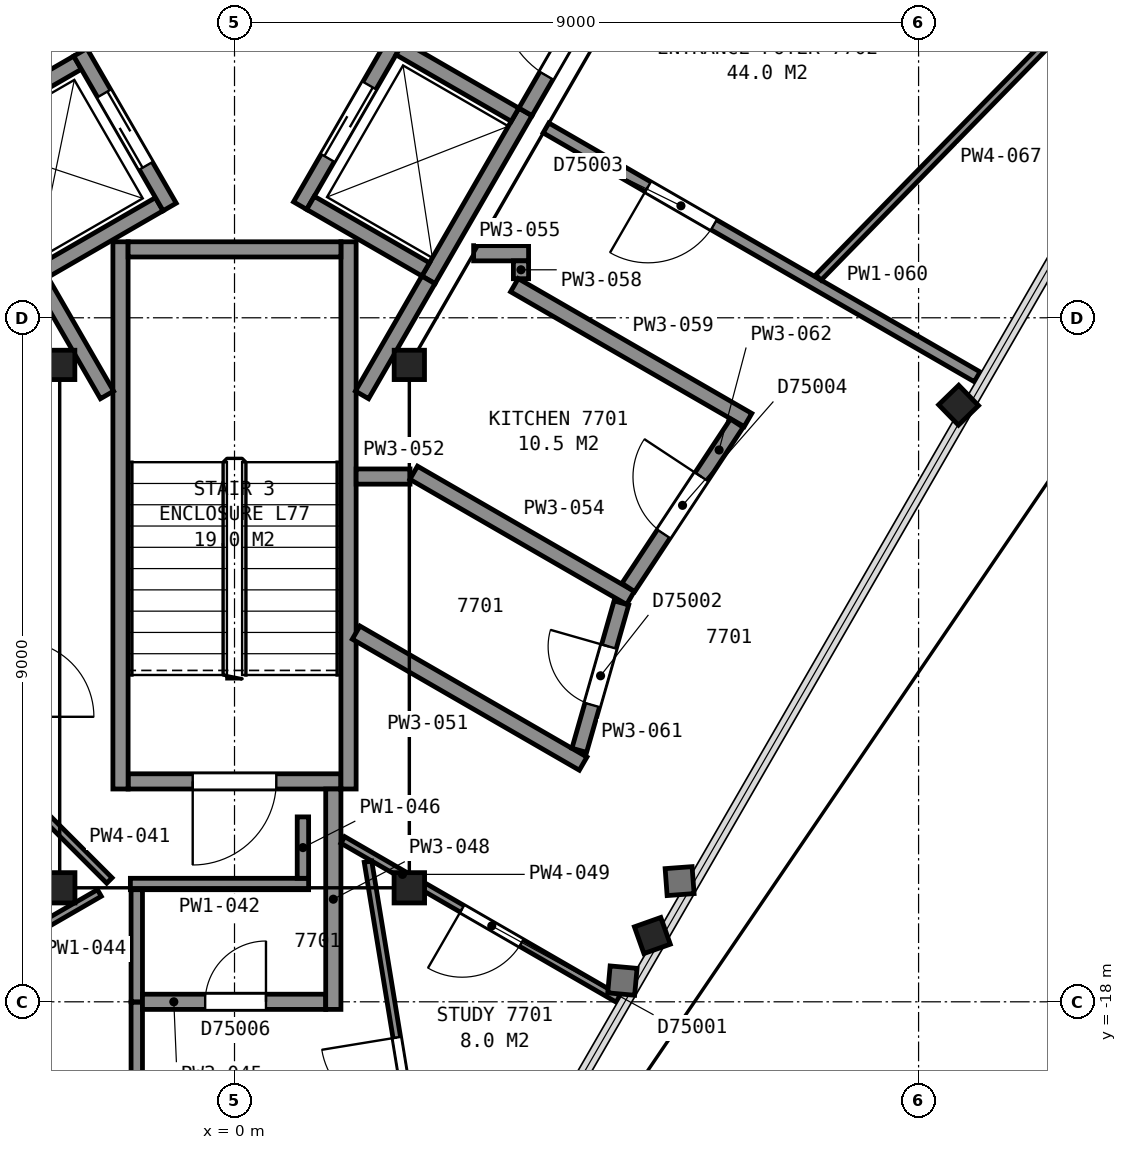
"""IFC4 building model, lengths in metres.
Left out: names, types, materials, properties, quantities, classifications, styles, units other than length and angle.
Written with IfcOpenShell. Run it as: python <this file> out.ifc"""

import sys

from ifc_helpers import new_model, si_unit, direction, frame, frame_2d, origin, origin_2d, place, context, subcontext, project, spatial, rectangle, i_section, extrude, element, fill, save


model = new_model("IFC4")
c1 = context("Model", 3, precision=1e-05, world=origin(), true_north=direction((0.0, 1.0)))
c2 = subcontext(c1, "Body", "Model", "MODEL_VIEW")
j1 = project(units=[si_unit("LENGTHUNIT", "METRE"), si_unit("PLANEANGLEUNIT", "RADIAN")], contexts=[c1])
p1 = place(None, origin())
s1 = spatial("IfcSite", under=j1, at=p1, CompositionType="ELEMENT")
p2 = place(p1, origin())
s2 = spatial("IfcBuilding", under=s1, at=p2, CompositionType="ELEMENT")
p3 = place(p2, frame((0.0, 0.0, 304.7)))
s3 = spatial("IfcBuildingStorey", under=s2, at=p3, CompositionType="ELEMENT", Elevation=304.7)
p4 = place(p3, frame((5.634, -17.512, 0.055), z_axis=(-0.112062196474, 0.31581164461, 0.942181017242), x_axis=(-0.487199113903, -0.843834781896, 0.224899720486)))
e1 = element("IfcColumn", 1, at=p4, inside=s3, PredefinedType="COLUMN", context=c2, shape_type="SweptSolid", body=[
    extrude(i_section(OverallWidth=0.373, OverallDepth=0.368, WebThickness=0.015, FlangeThickness=0.024, FilletRadius=0.015, at=origin_2d()), origin(), (0.0, 0.0, 1.0), 3.81),
])
p5 = place(p3, frame((9.751, -10.381, 0.045), z_axis=(-0.187414704281, 0.192691239229, 0.963195626518), x_axis=(-0.498724706912, -0.863448717299, 0.075696626808)))
e2 = element("IfcColumn", 2, at=p5, inside=s3, PredefinedType="COLUMN", context=c2, shape_type="SweptSolid", body=[
    extrude(i_section(OverallWidth=0.373, OverallDepth=0.368, WebThickness=0.015, FlangeThickness=0.024, FilletRadius=0.015, at=origin_2d()), origin(), (0.0, 0.0, 1.0), 3.748),
])
p6 = place(p3, frame((-2.3, -9.62, 0.0), z_axis=(0.0, 0.0, 1.0), x_axis=(1.0, 0.0, 0.0)))
e3 = element("IfcColumn", 3, at=p6, inside=s3, PredefinedType="COLUMN", context=c2, shape_type="SweptSolid", body=[
    extrude(i_section(OverallWidth=0.399, OverallDepth=0.386, WebThickness=0.021, FlangeThickness=0.033, FilletRadius=0.015, at=origin_2d()), origin(), (0.0, 0.0, 1.0), 3.7),
])
for number, where, z_axis, x_axis in (
    (4, (-2.3, -16.5, 0.0), (0.0, 0.0, 1.0), (-1.0, 0.0, 0.0)),
    (5, (2.3, -16.5, 0.0), (0.0, 0.0, 1.0), (-1.0, 0.0, 0.0)),
):
    element("IfcColumn", number, at=place(p3, frame(where, z_axis=z_axis, x_axis=x_axis)), inside=s3, PredefinedType="COLUMN", context=c2, shape_type="SweptSolid", body=[
        extrude(i_section(OverallWidth=0.401, OverallDepth=0.399, WebThickness=0.025, FlangeThickness=0.04, FilletRadius=0.015, at=origin_2d()), origin(), (0.0, 0.0, 1.0), 3.7),
    ])
p7 = place(p3, frame((2.3, -9.62, 0.0), z_axis=(0.0, 0.0, 1.0), x_axis=(1.0, 0.0, 0.0)))
e6 = element("IfcColumn", 6, at=p7, inside=s3, PredefinedType="COLUMN", context=c2, shape_type="SweptSolid", body=[
    extrude(i_section(OverallWidth=0.399, OverallDepth=0.386, WebThickness=0.021, FlangeThickness=0.033, FilletRadius=0.015, at=origin_2d()), origin(), (0.0, 0.0, 1.0), 3.7),
])
p8 = place(p3, frame((-1.4, -15.1, 0.0), z_axis=(0.0, 0.0, 1.0), x_axis=(1.0, 0.0, 0.0)))
e7 = element("IfcWall", 7, at=p8, inside=s3, PredefinedType="PARTITIONING", context=c2, shape_type="SweptSolid", body=[
    extrude(rectangle(XDim=2.8, YDim=0.2, at=frame_2d((1.4, 0.0))), origin(), (0.0, 0.0, 1.0), 3.45),
])
p9 = place(p8, frame((0.85, 0.0, 0.0)))
e8 = element("IfcOpeningElement", 8, at=p9, cuts=e7, PredefinedType="OPENING", context=c2, shape_type="SweptSolid", body=[
    extrude(rectangle(XDim=1.1, YDim=2.1, at=frame_2d((0.55, 1.05))), frame((0.0, 0.11, 0.0), z_axis=(0.0, -1.0, 0.0), x_axis=(1.0, 0.0, 0.0)), (0.0, 0.0, 1.0), 0.22),
])
for number, where, z_axis, x_axis in (
    (9, (1.5, -8.0, 0.0), (0.0, 0.0, 1.0), (0.0, -1.0, 0.0)),
    (10, (-1.5, -8.0, 0.0), (0.0, 0.0, 1.0), (0.0, -1.0, 0.0)),
):
    element("IfcWall", number, at=place(p3, frame(where, z_axis=z_axis, x_axis=x_axis)), inside=s3, PredefinedType="PARTITIONING", context=c2, shape_type="SweptSolid", body=[
        extrude(rectangle(XDim=7.2, YDim=0.2, at=frame_2d((3.6, 0.0))), origin(), (0.0, 0.0, 1.0), 3.45),
    ])
p10 = place(p3, frame((-1.4, -8.1, 0.0), z_axis=(0.0, 0.0, 1.0), x_axis=(1.0, 0.0, 0.0)))
e11 = element("IfcWall", 11, at=p10, inside=s3, PredefinedType="PARTITIONING", context=c2, shape_type="SweptSolid", body=[
    extrude(rectangle(XDim=2.8, YDim=0.2, at=frame_2d((1.4, 0.0))), origin(), (0.0, 0.0, 1.0), 3.45),
])
for number, where, z_axis, x_axis in (
    (12, (-2.505, -8.38, 0.0), (0.0, 0.0, 1.0), (0.866, 0.5, 0.0)),
    (13, (-3.58, -6.519, 0.0), (0.0, 0.0, 1.0), (0.866, 0.5, 0.0)),
):
    element("IfcWall", number, at=place(p3, frame(where, z_axis=z_axis, x_axis=x_axis)), inside=s3, PredefinedType="PARTITIONING", context=c2, shape_type="SweptSolid", body=[
        extrude(rectangle(XDim=1.75, YDim=0.2, at=frame_2d((0.875, 0.0))), origin(), (0.0, 0.0, 1.0), 3.7),
    ])
p11 = place(p3, frame((2.552, -8.5, 0.0), z_axis=(0.0, 0.0, 1.0), x_axis=(0.499990435942, 0.866030925526, 0.0)))
e14 = element("IfcWall", 14, at=p11, inside=s3, PredefinedType="PARTITIONING", context=c2, shape_type="SweptSolid", body=[
    extrude(rectangle(XDim=2.55, YDim=0.2, at=frame_2d((1.275, 0.0))), origin(), (0.0, 0.0, 1.0), 3.7),
])
p12 = place(p3, frame((0.863, -7.525, 0.0), z_axis=(0.0, 0.0, 1.0), x_axis=(0.499990435942, 0.866030925526, 0.0)))
e15 = element("IfcWall", 15, at=p12, inside=s3, PredefinedType="PARTITIONING", context=c2, shape_type="SweptSolid", body=[
    extrude(rectangle(XDim=2.55, YDim=0.2, at=frame_2d((1.275, 0.0))), origin(), (0.0, 0.0, 1.0), 3.7),
])
p13 = place(p12, frame((0.725, 0.0, 0.0)))
e16 = element("IfcOpeningElement", 16, at=p13, cuts=e15, PredefinedType="OPENING", context=c2, shape_type="SweptSolid", body=[
    extrude(rectangle(XDim=1.1, YDim=2.1, at=frame_2d((0.55, 1.05))), frame((0.0, 0.11, 0.0), z_axis=(0.0, -1.0, 0.0), x_axis=(1.0, 0.0, 0.0)), (0.0, 0.0, 1.0), 0.22),
])
p14 = place(p3, frame((-0.853, -7.542, 0.0), z_axis=(0.0, 0.0, 1.0), x_axis=(-0.500016218704, 0.866016039709, 0.0)))
e17 = element("IfcWall", 17, at=p14, inside=s3, PredefinedType="PARTITIONING", context=c2, shape_type="SweptSolid", body=[
    extrude(rectangle(XDim=2.35, YDim=0.2, at=frame_2d((1.175, 0.0))), origin(), (0.0, 0.0, 1.0), 3.7),
])
p15 = place(p14, frame((0.625, 0.0, 0.0)))
e18 = element("IfcOpeningElement", 18, at=p15, cuts=e17, PredefinedType="OPENING", context=c2, shape_type="SweptSolid", body=[
    extrude(rectangle(XDim=1.1, YDim=2.1, at=frame_2d((0.55, 1.05))), frame((0.0, 0.11, 0.0), z_axis=(0.0, -1.0, 0.0), x_axis=(1.0, 0.0, 0.0)), (0.0, 0.0, 1.0), 0.22),
])
for number, where, z_axis, x_axis in (
    (19, (3.69, -6.328, 0.0), (0.0, 0.0, 1.0), (-0.866, 0.5, 0.0)),
    (20, (2.515, -8.363, 0.0), (0.0, 0.0, 1.0), (-0.866, 0.5, 0.0)),
):
    element("IfcWall", number, at=place(p3, frame(where, z_axis=z_axis, x_axis=x_axis)), inside=s3, PredefinedType="PARTITIONING", context=c2, shape_type="SweptSolid", body=[
        extrude(rectangle(XDim=1.75, YDim=0.2, at=frame_2d((0.875, 0.0))), origin(), (0.0, 0.0, 1.0), 3.7),
    ])
p16 = place(p3, frame((-2.541, -8.519, 0.0), z_axis=(0.0, 0.0, 1.0), x_axis=(0.500016142392, -0.86601608377, 0.0)))
e21 = element("IfcWall", 21, at=p16, inside=s3, PredefinedType="PARTITIONING", context=c2, shape_type="SweptSolid", body=[
    extrude(rectangle(XDim=1.727, YDim=0.2, at=frame_2d((0.864, 0.0))), origin(), (0.0, 0.0, 1.0), 3.45),
])
p17 = place(p3, frame((1.677, -10.015, 0.0), z_axis=(0.0, 0.0, 1.0), x_axis=(0.49983532306, 0.866120459187, 0.0)))
e22 = element("IfcWall", 22, at=p17, inside=s3, PredefinedType="PARTITIONING", context=c2, shape_type="SweptSolid", body=[
    extrude(rectangle(XDim=1.748, YDim=0.2, at=frame_2d((0.874, 0.0))), origin(), (0.0, 0.0, 1.0), 3.45),
])
p18 = place(p3, frame((3.828, -6.29, 0.0), z_axis=(0.0, 0.0, 1.0), x_axis=(0.499979739078, 0.866037101117, 0.0)))
e23 = element("IfcWall", 23, at=p18, inside=s3, PredefinedType="PARTITIONING", context=c2, shape_type="SweptSolid", body=[
    extrude(rectangle(XDim=11.363, YDim=0.2, at=frame_2d((5.681, 0.0))), origin(), (0.0, 0.0, 1.0), 3.45),
])
p19 = place(p18, frame((0.55, 0.0, 0.0)))
e24 = element("IfcOpeningElement", 24, at=p19, cuts=e23, PredefinedType="OPENING", context=c2, shape_type="SweptSolid", body=[
    extrude(rectangle(XDim=1.2, YDim=2.1, at=frame_2d((0.6, 1.05))), frame((0.0, 0.11, 0.0), z_axis=(0.0, -1.0, 0.0), x_axis=(1.0, 0.0, 0.0)), (0.0, 0.0, 1.0), 0.22),
])
p20 = place(p3, frame((-1.778, -16.568, 0.0), z_axis=(0.0, 0.0, 1.0), x_axis=(-0.866019606374, -0.500010041276, 0.0)))
e25 = element("IfcWall", 25, at=p20, inside=s3, PredefinedType="PARTITIONING", context=c2, shape_type="SweptSolid", body=[
    extrude(rectangle(XDim=3.527, YDim=0.1, at=frame_2d((1.764, 0.0))), origin(), (0.0, 0.0, 1.0), 2.723),
])
p21 = place(p20, frame((1.124, 0.0, 0.0)))
e26 = element("IfcOpeningElement", 26, at=p21, cuts=e25, PredefinedType="OPENING", context=c2, shape_type="SweptSolid", body=[
    extrude(rectangle(XDim=1.0, YDim=2.1, at=frame_2d((0.5, 1.05))), frame((0.0, 0.06, 0.0), z_axis=(0.0, -1.0, 0.0), x_axis=(1.0, 0.0, 0.0)), (0.0, 0.0, 1.0), 0.12),
])
p22 = place(p3, frame((-2.801, -15.25, 0.0), z_axis=(0.0, 0.0, 1.0), x_axis=(0.707181547962, -0.707032006505, 0.0)))
e27 = element("IfcWall", 27, at=p22, inside=s3, PredefinedType="PARTITIONING", context=c2, shape_type="SweptSolid", body=[
    extrude(rectangle(XDim=1.633, YDim=0.1, at=frame_2d((0.816, 0.0))), origin(), (0.0, 0.0, 1.0), 2.723),
])
p23 = place(p3, frame((-1.37, -16.45, 0.0), z_axis=(0.0, 0.0, 1.0), x_axis=(1.0, 0.0, 0.0)))
e28 = element("IfcWall", 28, at=p23, inside=s3, PredefinedType="PARTITIONING", context=c2, shape_type="SweptSolid", body=[
    extrude(rectangle(XDim=2.345, YDim=0.15, at=frame_2d((1.173, 0.0))), origin(), (0.0, 0.0, 1.0), 2.723),
])
p24 = place(p3, frame((-1.286, -24.421, 0.0), z_axis=(0.0, 0.0, 1.0), x_axis=(0.0, 1.0, 0.0)))
e29 = element("IfcWall", 29, at=p24, inside=s3, PredefinedType="PARTITIONING", context=c2, shape_type="SweptSolid", body=[
    extrude(rectangle(XDim=6.416, YDim=0.15, at=frame_2d((3.208, 0.0))), origin(), (0.0, 0.0, 1.0), 2.723),
])
p25 = place(p3, frame((-1.286, -18.0, 0.0), z_axis=(0.0, 0.0, 1.0), x_axis=(0.0, 1.0, 0.0)))
e30 = element("IfcWall", 30, at=p25, inside=s3, PredefinedType="PARTITIONING", context=c2, shape_type="SweptSolid", body=[
    extrude(rectangle(XDim=1.475, YDim=0.15, at=frame_2d((0.738, 0.0))), origin(), (0.0, 0.0, 1.0), 2.723),
])
p26 = place(p3, frame((-1.211, -18.0, 0.0), z_axis=(0.0, 0.0, 1.0), x_axis=(1.0, 0.0, 0.0)))
e31 = element("IfcWall", 31, at=p26, inside=s3, PredefinedType="PARTITIONING", context=c2, shape_type="SweptSolid", body=[
    extrude(rectangle(XDim=2.411, YDim=0.2, at=frame_2d((1.206, 0.0))), origin(), (0.0, 0.0, 1.0), 2.723),
])
p27 = place(p26, frame((0.825, 0.0, 0.0)))
e32 = element("IfcOpeningElement", 32, at=p27, cuts=e31, PredefinedType="OPENING", context=c2, shape_type="SweptSolid", body=[
    extrude(rectangle(XDim=0.8, YDim=2.1, at=frame_2d((0.4, 1.05))), frame((0.0, 0.11, 0.0), z_axis=(0.0, -1.0, 0.0), x_axis=(1.0, 0.0, 0.0)), (0.0, 0.0, 1.0), 0.22),
])
p28 = place(p3, frame((0.9, -16.375, 0.0), z_axis=(0.0, 0.0, 1.0), x_axis=(0.0, 1.0, 0.0)))
e33 = element("IfcWall", 33, at=p28, inside=s3, PredefinedType="PARTITIONING", context=c2, shape_type="SweptSolid", body=[
    extrude(rectangle(XDim=0.808, YDim=0.15, at=frame_2d((0.404, 0.0))), origin(), (0.0, 0.0, 1.0), 2.723),
])
p29 = place(p3, frame((1.3, -18.1, 0.0), z_axis=(0.0, 0.0, 1.0), x_axis=(0.0, 1.0, 0.0)))
e34 = element("IfcWall", 34, at=p29, inside=s3, PredefinedType="PARTITIONING", context=c2, shape_type="SweptSolid", body=[
    extrude(rectangle(XDim=2.9, YDim=0.2, at=frame_2d((1.45, 0.0))), origin(), (0.0, 0.0, 1.0), 2.723),
])
p30 = place(p3, frame((5.047, -17.961, 0.0), z_axis=(0.0, 0.0, 1.0), x_axis=(-0.866050460131, 0.499956598623, 0.0)))
e35 = element("IfcWall", 35, at=p30, inside=s3, PredefinedType="PARTITIONING", context=c2, shape_type="SweptSolid", body=[
    extrude(rectangle(XDim=4.182, YDim=0.1, at=frame_2d((2.091, 0.0))), origin(), (0.0, 0.0, 1.0), 2.723),
])
p31 = place(p30, frame((1.469, 0.0, 0.0)))
e36 = element("IfcOpeningElement", 36, at=p31, cuts=e35, PredefinedType="OPENING", context=c2, shape_type="SweptSolid", body=[
    extrude(rectangle(XDim=0.9, YDim=2.1, at=frame_2d((0.45, 1.05))), frame((0.0, 0.06, 0.0), z_axis=(0.0, -1.0, 0.0), x_axis=(1.0, 0.0, 0.0)), (0.0, 0.0, 1.0), 0.12),
])
p32 = place(p3, frame((1.6, -13.142, 0.0), z_axis=(0.0, 0.0, 1.0), x_axis=(0.866078307516, -0.499908356852, 0.0)))
e37 = element("IfcWall", 37, at=p32, inside=s3, PredefinedType="PARTITIONING", context=c2, shape_type="SweptSolid", body=[
    extrude(rectangle(XDim=3.448, YDim=0.2, at=frame_2d((1.724, 0.0))), origin(), (0.0, 0.0, 1.0), 2.723),
])
p33 = place(p3, frame((1.6, -11.089, 0.0), z_axis=(0.0, 0.0, 1.0), x_axis=(1.0, 0.0, 0.0)))
e38 = element("IfcWall", 38, at=p33, inside=s3, PredefinedType="PARTITIONING", context=c2, shape_type="SweptSolid", body=[
    extrude(rectangle(XDim=0.709, YDim=0.2, at=frame_2d((0.354, 0.0))), origin(), (0.0, 0.0, 1.0), 2.723),
])
p34 = place(p3, frame((2.721, -22.048, 0.0), z_axis=(0.0, 0.0, 1.0), x_axis=(-0.161659467857, 0.98684660229, 0.0)))
e39 = element("IfcWall", 39, at=p34, inside=s3, PredefinedType="PARTITIONING", context=c2, shape_type="SweptSolid", body=[
    extrude(rectangle(XDim=5.97, YDim=0.1, at=frame_2d((2.985, 0.0))), origin(), (0.0, 0.0, 1.0), 2.723),
])
p35 = place(p34, frame((2.625, 0.0, 0.0)))
e40 = element("IfcOpeningElement", 40, at=p35, cuts=e39, PredefinedType="OPENING", context=c2, shape_type="SweptSolid", body=[
    extrude(rectangle(XDim=1.0, YDim=2.1, at=frame_2d((0.5, 1.05))), frame((0.0, 0.06, 0.0), z_axis=(0.0, -1.0, 0.0), x_axis=(1.0, 0.0, 0.0)), (0.0, 0.0, 1.0), 0.12),
])
p36 = place(p3, frame((2.357, -11.039, 0.0), z_axis=(0.0, 0.0, 1.0), x_axis=(0.865999185644, -0.500045408402, 0.0)))
e41 = element("IfcWall", 41, at=p36, inside=s3, PredefinedType="PARTITIONING", context=c2, shape_type="SweptSolid", body=[
    extrude(rectangle(XDim=3.294, YDim=0.2, at=frame_2d((1.647, 0.0))), origin(), (0.0, 0.0, 1.0), 2.723),
])
p37 = place(p3, frame((3.146, -8.151, 0.0), z_axis=(0.0, 0.0, 1.0), x_axis=(1.0, 0.0, 0.0)))
e42 = element("IfcWall", 42, at=p37, inside=s3, PredefinedType="PARTITIONING", context=c2, shape_type="SweptSolid", body=[
    extrude(rectangle(XDim=0.723, YDim=0.2, at=frame_2d((0.361, 0.0))), origin(), (0.0, 0.0, 1.0), 2.723),
])
p38 = place(p3, frame((3.769, -8.486, 0.0), z_axis=(0.0, 0.0, 1.0), x_axis=(0.0, 1.0, 0.0)))
e43 = element("IfcWall", 43, at=p38, inside=s3, PredefinedType="PARTITIONING", context=c2, shape_type="SweptSolid", body=[
    extrude(rectangle(XDim=0.235, YDim=0.2, at=frame_2d((0.118, 0.0))), origin(), (0.0, 0.0, 1.0), 2.723),
])
p39 = place(p3, frame((3.682, -8.571, 0.0), z_axis=(0.0, 0.0, 1.0), x_axis=(0.866075604562, -0.499913039621, 0.0)))
e44 = element("IfcWall", 44, at=p39, inside=s3, PredefinedType="PARTITIONING", context=c2, shape_type="SweptSolid", body=[
    extrude(rectangle(XDim=3.549, YDim=0.2, at=frame_2d((1.774, 0.0))), origin(), (0.0, 0.0, 1.0), 2.723),
])
p40 = place(p3, frame((9.772, -9.777, 0.0), z_axis=(0.0, 0.0, 1.0), x_axis=(-0.866083818164, 0.499898809675, 0.0)))
e45 = element("IfcWall", 45, at=p40, inside=s3, PredefinedType="PARTITIONING", context=c2, shape_type="SweptSolid", body=[
    extrude(rectangle(XDim=6.551, YDim=0.15, at=frame_2d((3.275, 0.0))), origin(), (0.0, 0.0, 1.0), 2.723),
])
p41 = place(p40, frame((4.001, 0.0, 0.0)))
e46 = element("IfcOpeningElement", 46, at=p41, cuts=e45, PredefinedType="OPENING", context=c2, shape_type="SweptSolid", body=[
    extrude(rectangle(XDim=1.0, YDim=2.1, at=frame_2d((0.5, 1.05))), frame((0.0, 0.085, 0.0), z_axis=(0.0, -1.0, 0.0), x_axis=(1.0, 0.0, 0.0)), (0.0, 0.0, 1.0), 0.17),
])
p42 = place(p3, frame((4.536, -14.691, 0.0), z_axis=(0.0, 0.0, 1.0), x_axis=(0.27486499374, 0.961482831472, 0.0)))
e47 = element("IfcWall", 47, at=p42, inside=s3, PredefinedType="PARTITIONING", context=c2, shape_type="SweptSolid", body=[
    extrude(rectangle(XDim=2.017, YDim=0.2, at=frame_2d((1.009, 0.0))), origin(), (0.0, 0.0, 1.0), 2.723),
])
p43 = place(p42, frame((0.62, 0.0, 0.0)))
e48 = element("IfcOpeningElement", 48, at=p43, cuts=e47, PredefinedType="OPENING", context=c2, shape_type="SweptSolid", body=[
    extrude(rectangle(XDim=0.8, YDim=2.1, at=frame_2d((0.4, 1.05))), frame((0.0, 0.11, 0.0), z_axis=(0.0, -1.0, 0.0), x_axis=(1.0, 0.0, 0.0)), (0.0, 0.0, 1.0), 0.22),
])
p44 = place(p3, frame((5.181, -12.548, 0.0), z_axis=(0.0, 0.0, 1.0), x_axis=(0.55106277299, 0.834463792039, 0.0)))
e49 = element("IfcWall", 49, at=p44, inside=s3, PredefinedType="PARTITIONING", context=c2, shape_type="SweptSolid", body=[
    extrude(rectangle(XDim=2.59, YDim=0.2, at=frame_2d((1.295, 0.0))), origin(), (0.0, 0.0, 1.0), 2.723),
])
p45 = place(p44, frame((0.845, 0.0, 0.0)))
e50 = element("IfcOpeningElement", 50, at=p45, cuts=e49, PredefinedType="OPENING", context=c2, shape_type="SweptSolid", body=[
    extrude(rectangle(XDim=0.9, YDim=2.1, at=frame_2d((0.45, 1.05))), frame((0.0, 0.11, 0.0), z_axis=(0.0, -1.0, 0.0), x_axis=(1.0, 0.0, 0.0)), (0.0, 0.0, 1.0), 0.22),
])
p46 = place(p3, frame((7.682, -8.47, 0.0), z_axis=(0.0, 0.0, 1.0), x_axis=(0.698777378461, 0.715339203002, 0.0)))
e51 = element("IfcWall", 51, at=p46, inside=s3, PredefinedType="PARTITIONING", context=c2, shape_type="SweptSolid", body=[
    extrude(rectangle(XDim=4.452, YDim=0.1, at=frame_2d((2.226, 0.0))), origin(), (0.0, 0.0, 1.0), 2.723),
])
p47 = place(p9, origin())
e52 = element("IfcDoor", 52, at=p47, inside=s3, OperationType="SINGLE_SWING_LEFT", PredefinedType="DOOR", context=c2, shape_type="SweptSolid", body=[
    extrude(rectangle(XDim=1.1, YDim=2.1, at=frame_2d((0.55, 1.05))), frame((0.0, 0.025, 0.0), z_axis=(0.0, -1.0, 0.0), x_axis=(1.0, 0.0, 0.0)), (0.0, 0.0, 1.0), 0.05),
])
fill(e8, e52)
p48 = place(p15, origin())
e53 = element("IfcDoor", 53, at=p48, inside=s3, OperationType="SLIDING_TO_LEFT", PredefinedType="DOOR", context=c2, shape_type="SweptSolid", body=[
    extrude(rectangle(XDim=1.1, YDim=2.1, at=frame_2d((0.55, 1.05))), frame((0.0, 0.025, 0.0), z_axis=(0.0, -1.0, 0.0), x_axis=(1.0, 0.0, 0.0)), (0.0, 0.0, 1.0), 0.05),
])
fill(e18, e53)
p49 = place(p13, origin())
e54 = element("IfcDoor", 54, at=p49, inside=s3, OperationType="SLIDING_TO_LEFT", PredefinedType="DOOR", context=c2, shape_type="SweptSolid", body=[
    extrude(rectangle(XDim=1.1, YDim=2.1, at=frame_2d((0.55, 1.05))), frame((0.0, 0.025, 0.0), z_axis=(0.0, -1.0, 0.0), x_axis=(1.0, 0.0, 0.0)), (0.0, 0.0, 1.0), 0.05),
])
fill(e16, e54)
p50 = place(p19, origin())
e55 = element("IfcDoor", 55, at=p50, inside=s3, OperationType="SINGLE_SWING_RIGHT", PredefinedType="DOOR", context=c2, shape_type="SweptSolid", body=[
    extrude(rectangle(XDim=1.2, YDim=2.1, at=frame_2d((0.6, 1.05))), frame((0.0, 0.025, 0.0), z_axis=(0.0, -1.0, 0.0), x_axis=(1.0, 0.0, 0.0)), (0.0, 0.0, 1.0), 0.05),
])
fill(e24, e55)
p51 = place(p27, origin())
e56 = element("IfcDoor", 56, at=p51, inside=s3, OperationType="SINGLE_SWING_RIGHT", PredefinedType="DOOR", context=c2, shape_type="SweptSolid", body=[
    extrude(rectangle(XDim=0.8, YDim=2.1, at=frame_2d((0.4, 1.05))), frame((0.0, 0.025, 0.0), z_axis=(0.0, -1.0, 0.0), x_axis=(1.0, 0.0, 0.0)), (0.0, 0.0, 1.0), 0.05),
])
fill(e32, e56)
p52 = place(p31, origin())
e57 = element("IfcDoor", 57, at=p52, inside=s3, OperationType="SINGLE_SWING_RIGHT", PredefinedType="DOOR", context=c2, shape_type="SweptSolid", body=[
    extrude(rectangle(XDim=0.9, YDim=2.1, at=frame_2d((0.45, 1.05))), frame((0.0, 0.025, 0.0), z_axis=(0.0, -1.0, 0.0), x_axis=(1.0, 0.0, 0.0)), (0.0, 0.0, 1.0), 0.05),
])
fill(e36, e57)
p53 = place(p35, origin())
e58 = element("IfcDoor", 58, at=p53, inside=s3, OperationType="SINGLE_SWING_RIGHT", PredefinedType="DOOR", context=c2, shape_type="SweptSolid", body=[
    extrude(rectangle(XDim=1.0, YDim=2.1, at=frame_2d((0.5, 1.05))), frame((0.0, 0.025, 0.0), z_axis=(0.0, -1.0, 0.0), x_axis=(1.0, 0.0, 0.0)), (0.0, 0.0, 1.0), 0.05),
])
fill(e40, e58)
p54 = place(p41, origin())
e59 = element("IfcDoor", 59, at=p54, inside=s3, OperationType="SINGLE_SWING_RIGHT", PredefinedType="DOOR", context=c2, shape_type="SweptSolid", body=[
    extrude(rectangle(XDim=1.0, YDim=2.1, at=frame_2d((0.5, 1.05))), frame((0.0, 0.025, 0.0), z_axis=(0.0, -1.0, 0.0), x_axis=(1.0, 0.0, 0.0)), (0.0, 0.0, 1.0), 0.05),
])
fill(e46, e59)
p55 = place(p43, origin())
e60 = element("IfcDoor", 60, at=p55, inside=s3, OperationType="SINGLE_SWING_RIGHT", PredefinedType="DOOR", context=c2, shape_type="SweptSolid", body=[
    extrude(rectangle(XDim=0.8, YDim=2.1, at=frame_2d((0.4, 1.05))), frame((0.0, 0.025, 0.0), z_axis=(0.0, -1.0, 0.0), x_axis=(1.0, 0.0, 0.0)), (0.0, 0.0, 1.0), 0.05),
])
fill(e48, e60)
p56 = place(p45, origin())
e61 = element("IfcDoor", 61, at=p56, inside=s3, OperationType="SINGLE_SWING_RIGHT", PredefinedType="DOOR", context=c2, shape_type="SweptSolid", body=[
    extrude(rectangle(XDim=0.9, YDim=2.1, at=frame_2d((0.45, 1.05))), frame((0.0, 0.025, 0.0), z_axis=(0.0, -1.0, 0.0), x_axis=(1.0, 0.0, 0.0)), (0.0, 0.0, 1.0), 0.05),
])
fill(e50, e61)
save(model, sys.argv[1])
